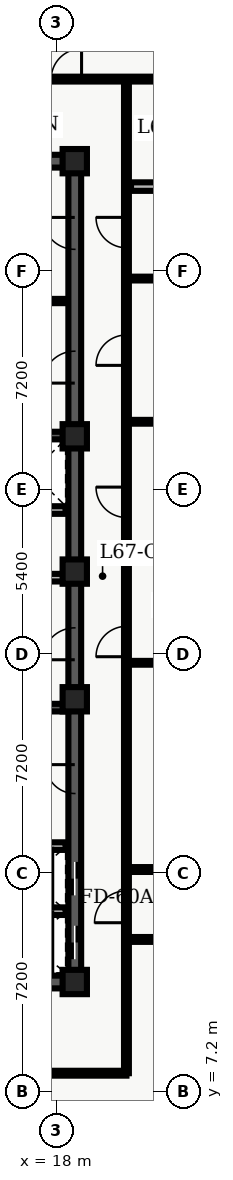
"""IFC4 building model, lengths in metres.
Left out: names, types, materials, properties, quantities, classifications, styles, units other than length and angle.
Written with IfcOpenShell. Run it as: python <this file> out.ifc"""

import sys

from ifc_helpers import new_model, entity, si_unit, converted_unit, direction, frame, origin_with_axes, origin_2d_with_axis, place, context, subcontext, project, spatial, polyline, rectangle, outline, extrude, element, fill, save


model = new_model("IFC4")
c1 = context("Model", 3, precision=1e-05, world=origin_with_axes(), true_north=direction((0.0, 1.0)))
c2 = subcontext(c1, "Body", "Model", "MODEL_VIEW")
j1 = project(units=[si_unit("LENGTHUNIT", "METRE"), converted_unit("PLANEANGLEUNIT", "DEGREE", entity("IfcPlaneAngleMeasure", 0.017), si_unit("PLANEANGLEUNIT", "RADIAN"), dimensions=[0, 0, 0, 0, 0, 0, 0])], contexts=[c1])
p1 = place(None, origin_with_axes())
s1 = spatial("IfcSite", under=j1, at=p1, CompositionType="ELEMENT")
p2 = place(p1, origin_with_axes())
s2 = spatial("IfcBuilding", under=s1, at=p2, CompositionType="ELEMENT")
p3 = place(p2, frame((0.0, 0.0, 272.4), z_axis=(0.0, 0.0, 1.0), x_axis=(1.0, 0.0, 0.0)))
s3 = spatial("IfcBuildingStorey", under=s2, at=p3, CompositionType="ELEMENT", Elevation=272.4)
p4 = place(p3, frame((11.4, 10.8, 0.0), z_axis=(0.0, 0.0, 1.0), x_axis=(1.0, 0.0, 0.0)))
e1 = element("IfcWall", 1, at=p4, inside=s3, PredefinedType="SHEAR", context=c2, shape_type="SweptSolid", body=[
    extrude(outline(polyline([(0.0, -0.21), (7.2, -0.21), (7.2, 0.21), (0.0, 0.21), (0.0, -0.21)])), origin_with_axes(), (0.0, 0.0, 1.0), 3.66),
])
p5 = place(p4, frame((2.625, 0.0, 0.0), z_axis=(0.0, 0.0, 1.0), x_axis=(1.0, 0.0, 0.0)))
e2 = element("IfcOpeningElement", 2, at=p5, cuts=e1, PredefinedType="OPENING", context=c2, shape_type="SweptSolid", body=[
    extrude(rectangle(XDim=1.05, YDim=0.44, at=origin_2d_with_axis()), origin_with_axes(), (0.0, 0.0, 1.0), 2.15),
])
p6 = place(p3, frame((11.4, 37.8, 0.0), z_axis=(0.0, 0.0, 1.0), x_axis=(1.0, 0.0, 0.0)))
e3 = element("IfcWall", 3, at=p6, inside=s3, PredefinedType="SHEAR", context=c2, shape_type="SweptSolid", body=[
    extrude(outline(polyline([(0.0, -0.21), (7.2, -0.21), (7.2, 0.21), (0.0, 0.21), (0.0, -0.21)])), origin_with_axes(), (0.0, 0.0, 1.0), 3.66),
])
p7 = place(p6, frame((2.625, 0.0, 0.0), z_axis=(0.0, 0.0, 1.0), x_axis=(1.0, 0.0, 0.0)))
e4 = element("IfcOpeningElement", 4, at=p7, cuts=e3, PredefinedType="OPENING", context=c2, shape_type="SweptSolid", body=[
    extrude(rectangle(XDim=1.05, YDim=0.44, at=origin_2d_with_axis()), origin_with_axes(), (0.0, 0.0, 1.0), 2.15),
])
p8 = place(p3, frame((18.6, 10.8, 0.0), z_axis=(0.0, 0.0, 1.0), x_axis=(0.0, 1.0, 0.0)))
e5 = element("IfcWall", 5, at=p8, inside=s3, PredefinedType="SHEAR", context=c2, shape_type="SweptSolid", body=[
    extrude(outline(polyline([(0.0, -0.21), (13.5, -0.21), (13.5, 0.21), (0.0, 0.21), (0.0, -0.21)])), origin_with_axes(), (0.0, 0.0, 1.0), 3.66),
])
p9 = place(p8, frame((1.3, 0.0, 0.0), z_axis=(0.0, 0.0, 1.0), x_axis=(1.0, 0.0, 0.0)))
e6 = element("IfcOpeningElement", 6, at=p9, cuts=e5, PredefinedType="OPENING", context=c2, shape_type="SweptSolid", body=[
    extrude(rectangle(XDim=1.1, YDim=0.44, at=origin_2d_with_axis()), origin_with_axes(), (0.0, 0.0, 1.0), 2.15),
])
p10 = place(p8, frame((3.4, 0.0, 0.0), z_axis=(0.0, 0.0, 1.0), x_axis=(1.0, 0.0, 0.0)))
e7 = element("IfcOpeningElement", 7, at=p10, cuts=e5, PredefinedType="OPENING", context=c2, shape_type="SweptSolid", body=[
    extrude(rectangle(XDim=1.1, YDim=0.44, at=origin_2d_with_axis()), origin_with_axes(), (0.0, 0.0, 1.0), 2.15),
])
p11 = place(p8, frame((11.125, 0.0, 0.0), z_axis=(0.0, 0.0, 1.0), x_axis=(1.0, 0.0, 0.0)))
e8 = element("IfcOpeningElement", 8, at=p11, cuts=e5, PredefinedType="OPENING", context=c2, shape_type="SweptSolid", body=[
    extrude(rectangle(XDim=1.05, YDim=0.44, at=origin_2d_with_axis()), origin_with_axes(), (0.0, 0.0, 1.0), 2.15),
])
p12 = place(p8, frame((6.675, 0.0, 0.0), z_axis=(0.0, 0.0, 1.0), x_axis=(1.0, 0.0, 0.0)))
e9 = element("IfcOpeningElement", 9, at=p12, cuts=e5, PredefinedType="OPENING", context=c2, shape_type="SweptSolid", body=[
    extrude(rectangle(XDim=0.95, YDim=0.44, at=origin_2d_with_axis()), origin_with_axes(), (0.0, 0.0, 1.0), 2.15),
])
p13 = place(p3, frame((18.6, 24.3, 0.0), z_axis=(0.0, 0.0, 1.0), x_axis=(0.0, 1.0, 0.0)))
e10 = element("IfcWall", 10, at=p13, inside=s3, PredefinedType="SHEAR", context=c2, shape_type="SweptSolid", body=[
    extrude(outline(polyline([(0.0, -0.21), (13.5, -0.21), (13.5, 0.21), (0.0, 0.21), (0.0, -0.21)])), origin_with_axes(), (0.0, 0.0, 1.0), 3.66),
])
p14 = place(p13, frame((6.725, 0.0, 0.0), z_axis=(0.0, 0.0, 1.0), x_axis=(1.0, 0.0, 0.0)))
e11 = element("IfcOpeningElement", 11, at=p14, cuts=e10, PredefinedType="OPENING", context=c2, shape_type="SweptSolid", body=[
    extrude(rectangle(XDim=1.05, YDim=0.44, at=origin_2d_with_axis()), origin_with_axes(), (0.0, 0.0, 1.0), 2.15),
])
p15 = place(p13, frame((11.125, 0.0, 0.0), z_axis=(0.0, 0.0, 1.0), x_axis=(1.0, 0.0, 0.0)))
e12 = element("IfcOpeningElement", 12, at=p15, cuts=e10, PredefinedType="OPENING", context=c2, shape_type="SweptSolid", body=[
    extrude(rectangle(XDim=1.05, YDim=0.44, at=origin_2d_with_axis()), origin_with_axes(), (0.0, 0.0, 1.0), 2.15),
])
for number, where, z_axis, x_axis in (
    (13, (11.61, 19.825, 0.0), (0.0, 0.0, 1.0), (1.0, 0.0, 0.0)),
    (14, (11.61, 28.775, 0.0), (0.0, 0.0, 1.0), (1.0, 0.0, 0.0)),
):
    element("IfcWall", number, at=place(p3, frame(where, z_axis=z_axis, x_axis=x_axis)), inside=s3, PredefinedType="SHEAR", context=c2, shape_type="SweptSolid", body=[
        extrude(outline(polyline([(0.0, -0.125), (6.78, -0.125), (6.78, 0.125), (0.0, 0.125), (0.0, -0.125)])), origin_with_axes(), (0.0, 0.0, 1.0), 3.66),
    ])
p16 = place(p3, frame((11.7, 24.1, 0.0), z_axis=(0.0, 0.0, 1.0), x_axis=(1.0, 0.0, 0.0)))
e15 = element("IfcWall", 15, at=p16, inside=s3, PredefinedType="SOLIDWALL", context=c2, shape_type="SweptSolid", body=[
    extrude(outline(polyline([(0.0, -0.125), (6.6, -0.125), (6.6, 0.125), (0.0, 0.125), (0.0, -0.125)])), origin_with_axes(), (0.0, 0.0, 1.0), 2.7),
])
p17 = place(p16, frame((3.6, 0.0, 0.0), z_axis=(0.0, 0.0, 1.0), x_axis=(1.0, 0.0, 0.0)))
e16 = element("IfcOpeningElement", 16, at=p17, cuts=e15, PredefinedType="OPENING", context=c2, shape_type="SweptSolid", body=[
    extrude(rectangle(XDim=0.9, YDim=0.27, at=origin_2d_with_axis()), origin_with_axes(), (0.0, 0.0, 1.0), 2.15),
])
p18 = place(p16, frame((5.65, 0.0, 0.0), z_axis=(0.0, 0.0, 1.0), x_axis=(1.0, 0.0, 0.0)))
e17 = element("IfcOpeningElement", 17, at=p18, cuts=e15, PredefinedType="OPENING", context=c2, shape_type="SweptSolid", body=[
    extrude(rectangle(XDim=0.9, YDim=0.27, at=origin_2d_with_axis()), origin_with_axes(), (0.0, 0.0, 1.0), 2.15),
])
p19 = place(p3, frame((11.7, 26.325, 0.0), z_axis=(0.0, 0.0, 1.0), x_axis=(1.0, 0.0, 0.0)))
e18 = element("IfcWall", 18, at=p19, inside=s3, PredefinedType="SOLIDWALL", context=c2, shape_type="SweptSolid", body=[
    extrude(outline(polyline([(0.0, -0.125), (6.6, -0.125), (6.6, 0.125), (0.0, 0.125), (0.0, -0.125)])), origin_with_axes(), (0.0, 0.0, 1.0), 2.7),
])
p20 = place(p19, frame((3.5, 0.0, 0.0), z_axis=(0.0, 0.0, 1.0), x_axis=(1.0, 0.0, 0.0)))
e19 = element("IfcOpeningElement", 19, at=p20, cuts=e18, PredefinedType="OPENING", context=c2, shape_type="SweptSolid", body=[
    extrude(rectangle(XDim=0.9, YDim=0.27, at=origin_2d_with_axis()), origin_with_axes(), (0.0, 0.0, 1.0), 2.15),
])
for number, where, z_axis, x_axis in (
    (20, (18.6, 10.8, 0.0), (0.0, 0.0, 1.0), (1.0, 0.0, 0.0)),
    (21, (18.6, 20.1, 0.0), (0.0, 0.0, 1.0), (1.0, 0.0, 0.0)),
    (22, (18.6, 24.3, 0.0), (0.0, 0.0, 1.0), (1.0, 0.0, 0.0)),
    (23, (18.6, 28.75, 0.0), (0.0, 0.0, 1.0), (1.0, 0.0, 0.0)),
    (24, (18.6, 37.8, 0.0), (0.0, 0.0, 1.0), (1.0, 0.0, 0.0)),
):
    element("IfcColumn", number, at=place(p3, frame(where, z_axis=z_axis, x_axis=x_axis)), inside=s3, PredefinedType="COLUMN", context=c2, shape_type="SweptSolid", body=[
        extrude(rectangle(XDim=0.8, YDim=0.8, at=origin_2d_with_axis()), origin_with_axes(), (0.0, 0.0, 1.0), 3.9),
    ])
for number, where, z_axis, x_axis in (
    (25, (15.84, 13.13, 0.0), (0.0, 0.0, 1.0), (1.0, 0.0, 0.0)),
    (26, (15.84, 15.27, 0.0), (0.0, 0.0, 1.0), (1.0, 0.0, 0.0)),
):
    element("IfcWall", number, at=place(p3, frame(where, z_axis=z_axis, x_axis=x_axis)), inside=s3, PredefinedType="SOLIDWALL", context=c2, shape_type="SweptSolid", body=[
        extrude(outline(polyline([(0.0, -0.125), (2.46, -0.125), (2.46, 0.125), (0.0, 0.125), (0.0, -0.125)])), origin_with_axes(), (0.0, 0.0, 1.0), 2.7),
    ])
p21 = place(p3, frame((15.84, 33.2, 0.0), z_axis=(0.0, 0.0, 1.0), x_axis=(1.0, 0.0, 0.0)))
e27 = element("IfcWall", 27, at=p21, inside=s3, PredefinedType="PARTITIONING", context=c2, shape_type="SweptSolid", body=[
    extrude(outline(polyline([(0.0, -0.07), (2.46, -0.07), (2.46, 0.07), (0.0, 0.07), (0.0, -0.07)])), origin_with_axes(), (0.0, 0.0, 1.0), 2.7),
])
p22 = place(p3, frame((8.135, 7.8, 0.0), z_axis=(0.0, 0.0, 1.0), x_axis=(1.0, 0.0, 0.0)))
e28 = element("IfcWall", 28, at=p22, inside=s3, PredefinedType="PARTITIONING", context=c2, shape_type="SweptSolid", body=[
    extrude(outline(polyline([(0.0, -0.08), (12.165, -0.08), (12.165, 0.08), (0.0, 0.08), (0.0, -0.08)])), origin_with_axes(), (0.0, 0.0, 1.0), 2.7),
])
p23 = place(p22, frame((3.994, 0.0, 0.0), z_axis=(0.0, 0.0, 1.0), x_axis=(1.0, 0.0, 0.0)))
e29 = element("IfcOpeningElement", 29, at=p23, cuts=e28, PredefinedType="OPENING", context=c2, shape_type="SweptSolid", body=[
    extrude(rectangle(XDim=1.0, YDim=0.18, at=origin_2d_with_axis()), origin_with_axes(), (0.0, 0.0, 1.0), 2.15),
])
p24 = place(p22, frame((8.794, 0.0, 0.0), z_axis=(0.0, 0.0, 1.0), x_axis=(1.0, 0.0, 0.0)))
e30 = element("IfcOpeningElement", 30, at=p24, cuts=e28, PredefinedType="OPENING", context=c2, shape_type="SweptSolid", body=[
    extrude(rectangle(XDim=1.0, YDim=0.18, at=origin_2d_with_axis()), origin_with_axes(), (0.0, 0.0, 1.0), 2.15),
])
p25 = place(p3, frame((8.135, 40.5, 0.0), z_axis=(0.0, 0.0, 1.0), x_axis=(1.0, 0.0, 0.0)))
e31 = element("IfcWall", 31, at=p25, inside=s3, PredefinedType="PARTITIONING", context=c2, shape_type="SweptSolid", body=[
    extrude(outline(polyline([(0.0, -0.08), (23.93, -0.08), (23.93, 0.08), (0.0, 0.08), (0.0, -0.08)])), origin_with_axes(), (0.0, 0.0, 1.0), 2.7),
])
p26 = place(p25, frame((0.76, 0.0, 0.0), z_axis=(0.0, 0.0, 1.0), x_axis=(1.0, 0.0, 0.0)))
e32 = element("IfcOpeningElement", 32, at=p26, cuts=e31, PredefinedType="OPENING", context=c2, shape_type="SweptSolid", body=[
    extrude(rectangle(XDim=1.0, YDim=0.18, at=origin_2d_with_axis()), origin_with_axes(), (0.0, 0.0, 1.0), 2.15),
])
p27 = place(p25, frame((4.729, 0.0, 0.0), z_axis=(0.0, 0.0, 1.0), x_axis=(1.0, 0.0, 0.0)))
e33 = element("IfcOpeningElement", 33, at=p27, cuts=e31, PredefinedType="OPENING", context=c2, shape_type="SweptSolid", body=[
    extrude(rectangle(XDim=1.0, YDim=0.18, at=origin_2d_with_axis()), origin_with_axes(), (0.0, 0.0, 1.0), 2.15),
])
p28 = place(p25, frame((7.574, 0.0, 0.0), z_axis=(0.0, 0.0, 1.0), x_axis=(1.0, 0.0, 0.0)))
e34 = element("IfcOpeningElement", 34, at=p28, cuts=e31, PredefinedType="OPENING", context=c2, shape_type="SweptSolid", body=[
    extrude(rectangle(XDim=1.0, YDim=0.18, at=origin_2d_with_axis()), origin_with_axes(), (0.0, 0.0, 1.0), 2.15),
])
p29 = place(p25, frame((10.189, 0.0, 0.0), z_axis=(0.0, 0.0, 1.0), x_axis=(1.0, 0.0, 0.0)))
e35 = element("IfcOpeningElement", 35, at=p29, cuts=e31, PredefinedType="OPENING", context=c2, shape_type="SweptSolid", body=[
    extrude(rectangle(XDim=1.0, YDim=0.18, at=origin_2d_with_axis()), origin_with_axes(), (0.0, 0.0, 1.0), 2.15),
])
p30 = place(p3, frame((20.3, 7.8, 0.0), z_axis=(0.0, 0.0, 1.0), x_axis=(0.0, 1.0, 0.0)))
e36 = element("IfcWall", 36, at=p30, inside=s3, PredefinedType="PARTITIONING", context=c2, shape_type="SweptSolid", body=[
    extrude(outline(polyline([(0.0, -0.08), (32.7, -0.08), (32.7, 0.08), (0.0, 0.08), (0.0, -0.08)])), origin_with_axes(), (0.0, 0.0, 1.0), 2.7),
])
p31 = place(p30, frame((14.2, 0.0, 0.0), z_axis=(0.0, 0.0, 1.0), x_axis=(1.0, 0.0, 0.0)))
e37 = element("IfcOpeningElement", 37, at=p31, cuts=e36, PredefinedType="OPENING", context=c2, shape_type="SweptSolid", body=[
    extrude(rectangle(XDim=1.0, YDim=0.18, at=origin_2d_with_axis()), origin_with_axes(), (0.0, 0.0, 1.0), 2.15),
])
p32 = place(p30, frame((18.779, 0.0, 0.0), z_axis=(0.0, 0.0, 1.0), x_axis=(1.0, 0.0, 0.0)))
e38 = element("IfcOpeningElement", 38, at=p32, cuts=e36, PredefinedType="OPENING", context=c2, shape_type="SweptSolid", body=[
    extrude(rectangle(XDim=1.0, YDim=0.18, at=origin_2d_with_axis()), origin_with_axes(), (0.0, 0.0, 1.0), 2.15),
])
p33 = place(p30, frame((23.784, 0.0, 0.0), z_axis=(0.0, 0.0, 1.0), x_axis=(1.0, 0.0, 0.0)))
e39 = element("IfcOpeningElement", 39, at=p33, cuts=e36, PredefinedType="OPENING", context=c2, shape_type="SweptSolid", body=[
    extrude(rectangle(XDim=1.0, YDim=0.18, at=origin_2d_with_axis()), origin_with_axes(), (0.0, 0.0, 1.0), 2.15),
])
p34 = place(p30, frame((27.651, 0.0, 0.0), z_axis=(0.0, 0.0, 1.0), x_axis=(1.0, 0.0, 0.0)))
e40 = element("IfcOpeningElement", 40, at=p34, cuts=e36, PredefinedType="OPENING", context=c2, shape_type="SweptSolid", body=[
    extrude(rectangle(XDim=1.0, YDim=0.18, at=origin_2d_with_axis()), origin_with_axes(), (0.0, 0.0, 1.0), 2.15),
])
p35 = place(p30, frame((5.475, 0.0, 0.0), z_axis=(0.0, 0.0, 1.0), x_axis=(1.0, 0.0, 0.0)))
e41 = element("IfcOpeningElement", 41, at=p35, cuts=e36, PredefinedType="OPENING", context=c2, shape_type="SweptSolid", body=[
    extrude(rectangle(XDim=1.05, YDim=0.18, at=origin_2d_with_axis()), origin_with_axes(), (0.0, 0.0, 1.0), 2.15),
])
p36 = place(p3, frame((20.45, 25.05, 0.0), z_axis=(0.0, 0.0, 1.0), x_axis=(1.0, 0.0, 0.0)))
e42 = element("IfcWall", 42, at=p36, inside=s3, PredefinedType="PARTITIONING", context=c2, shape_type="SweptSolid", body=[
    extrude(outline(polyline([(0.0, -0.14), (11.615, -0.14), (11.615, 0.14), (0.0, 0.14), (0.0, -0.14)])), origin_with_axes(), (0.0, 0.0, 1.0), 2.7),
])
for number, where, z_axis, x_axis in (
    (43, (20.45, 29.228, 0.0), (0.0, 0.0, 1.0), (1.0, 0.0, 0.0)),
    (44, (20.45, 33.939, 0.0), (0.0, 0.0, 1.0), (1.0, 0.0, 0.0)),
):
    element("IfcWall", number, at=place(p3, frame(where, z_axis=z_axis, x_axis=x_axis)), inside=s3, PredefinedType="PARTITIONING", context=c2, shape_type="SweptSolid", body=[
        extrude(outline(polyline([(0.0, -0.062), (11.615, -0.062), (11.615, 0.062), (0.0, 0.062), (0.0, -0.062)])), origin_with_axes(), (0.0, 0.0, 1.0), 2.7),
    ])
p37 = place(p3, frame((20.45, 36.964, 0.0), z_axis=(0.0, 0.0, 1.0), x_axis=(1.0, 0.0, 0.0)))
e45 = element("IfcWall", 45, at=p37, inside=s3, PredefinedType="PARTITIONING", context=c2, shape_type="SweptSolid", body=[
    extrude(outline(polyline([(0.0, -0.14), (11.615, -0.14), (11.615, 0.14), (0.0, 0.14), (0.0, -0.14)])), origin_with_axes(), (0.0, 0.0, 1.0), 2.7),
])
p38 = place(p37, frame((3.375, 0.0, 0.0), z_axis=(0.0, 0.0, 1.0), x_axis=(1.0, 0.0, 0.0)))
e46 = element("IfcOpeningElement", 46, at=p38, cuts=e45, PredefinedType="OPENING", context=c2, shape_type="SweptSolid", body=[
    extrude(rectangle(XDim=0.95, YDim=0.3, at=origin_2d_with_axis()), origin_with_axes(), (0.0, 0.0, 1.0), 2.15),
])
p39 = place(p3, frame((20.3, 12.2, 0.0), z_axis=(0.0, 0.0, 1.0), x_axis=(1.0, 0.0, 0.0)))
e47 = element("IfcWall", 47, at=p39, inside=s3, PredefinedType="PARTITIONING", context=c2, shape_type="SweptSolid", body=[
    extrude(outline(polyline([(0.0, -0.08), (14.85, -0.08), (14.85, 0.08), (0.0, 0.08), (0.0, -0.08)])), origin_with_axes(), (0.0, 0.0, 1.0), 2.7),
])
p40 = place(p39, frame((8.355, 0.0, 0.0), z_axis=(0.0, 0.0, 1.0), x_axis=(1.0, 0.0, 0.0)))
e48 = element("IfcOpeningElement", 48, at=p40, cuts=e47, PredefinedType="OPENING", context=c2, shape_type="SweptSolid", body=[
    extrude(rectangle(XDim=1.0, YDim=0.18, at=origin_2d_with_axis()), origin_with_axes(), (0.0, 0.0, 1.0), 2.15),
])
p41 = place(p3, frame((20.3, 14.5, 0.0), z_axis=(0.0, 0.0, 1.0), x_axis=(1.0, 0.0, 0.0)))
e49 = element("IfcWall", 49, at=p41, inside=s3, PredefinedType="PARTITIONING", context=c2, shape_type="SweptSolid", body=[
    extrude(outline(polyline([(0.0, -0.08), (14.85, -0.08), (14.85, 0.08), (0.0, 0.08), (0.0, -0.08)])), origin_with_axes(), (0.0, 0.0, 1.0), 2.7),
])
p42 = place(p41, frame((1.739, 0.0, 0.0), z_axis=(0.0, 0.0, 1.0), x_axis=(1.0, 0.0, 0.0)))
e50 = element("IfcOpeningElement", 50, at=p42, cuts=e49, PredefinedType="OPENING", context=c2, shape_type="SweptSolid", body=[
    extrude(rectangle(XDim=1.0, YDim=0.18, at=origin_2d_with_axis()), origin_with_axes(), (0.0, 0.0, 1.0), 2.15),
])
p43 = place(p41, frame((5.299, 0.0, 0.0), z_axis=(0.0, 0.0, 1.0), x_axis=(1.0, 0.0, 0.0)))
e51 = element("IfcOpeningElement", 51, at=p43, cuts=e49, PredefinedType="OPENING", context=c2, shape_type="SweptSolid", body=[
    extrude(rectangle(XDim=1.0, YDim=0.18, at=origin_2d_with_axis()), origin_with_axes(), (0.0, 0.0, 1.0), 2.15),
])
p44 = place(p41, frame((8.889, 0.0, 0.0), z_axis=(0.0, 0.0, 1.0), x_axis=(1.0, 0.0, 0.0)))
e52 = element("IfcOpeningElement", 52, at=p44, cuts=e49, PredefinedType="OPENING", context=c2, shape_type="SweptSolid", body=[
    extrude(rectangle(XDim=1.0, YDim=0.18, at=origin_2d_with_axis()), origin_with_axes(), (0.0, 0.0, 1.0), 2.15),
])
p45 = place(p41, frame((12.624, 0.0, 0.0), z_axis=(0.0, 0.0, 1.0), x_axis=(1.0, 0.0, 0.0)))
e53 = element("IfcOpeningElement", 53, at=p45, cuts=e49, PredefinedType="OPENING", context=c2, shape_type="SweptSolid", body=[
    extrude(rectangle(XDim=1.0, YDim=0.18, at=origin_2d_with_axis()), origin_with_axes(), (0.0, 0.0, 1.0), 2.15),
])
p46 = place(p3, frame((20.3, 21.3, 0.0), z_axis=(0.0, 0.0, 1.0), x_axis=(1.0, 0.0, 0.0)))
e54 = element("IfcWall", 54, at=p46, inside=s3, PredefinedType="PARTITIONING", context=c2, shape_type="SweptSolid", body=[
    extrude(outline(polyline([(0.0, -0.062), (11.765, -0.062), (11.765, 0.062), (0.0, 0.062), (0.0, -0.062)])), origin_with_axes(), (0.0, 0.0, 1.0), 2.7),
])
p47 = place(p8, frame((1.3, 0.0, 0.0), z_axis=(0.0, 0.0, 1.0), x_axis=(1.0, 0.0, 0.0)))
e55 = element("IfcDoor", 55, at=p47, inside=s3, OperationType="SLIDING_TO_LEFT", PredefinedType="DOOR", context=c2, shape_type="SweptSolid", body=[
    extrude(rectangle(XDim=1.1, YDim=0.09, at=origin_2d_with_axis()), origin_with_axes(), (0.0, 0.0, 1.0), 2.15),
])
fill(e6, e55)
p48 = place(p8, frame((3.4, 0.0, 0.0), z_axis=(0.0, 0.0, 1.0), x_axis=(1.0, 0.0, 0.0)))
e56 = element("IfcDoor", 56, at=p48, inside=s3, OperationType="SLIDING_TO_RIGHT", PredefinedType="DOOR", context=c2, shape_type="SweptSolid", body=[
    extrude(rectangle(XDim=1.1, YDim=0.09, at=origin_2d_with_axis()), origin_with_axes(), (0.0, 0.0, 1.0), 2.15),
])
fill(e7, e56)
p49 = place(p8, frame((11.125, 0.0, 0.0), z_axis=(0.0, 0.0, 1.0), x_axis=(1.0, 0.0, 0.0)))
e57 = element("IfcDoor", 57, at=p49, inside=s3, OperationType="SINGLE_SWING_LEFT", PredefinedType="DOOR", context=c2, shape_type="SweptSolid", body=[
    extrude(rectangle(XDim=1.05, YDim=0.09, at=origin_2d_with_axis()), origin_with_axes(), (0.0, 0.0, 1.0), 2.15),
])
fill(e8, e57)
p50 = place(p8, frame((6.675, 0.0, 0.0), z_axis=(0.0, 0.0, 1.0), x_axis=(1.0, 0.0, 0.0)))
e58 = element("IfcDoor", 58, at=p50, inside=s3, OperationType="SINGLE_SWING_RIGHT", PredefinedType="DOOR", context=c2, shape_type="SweptSolid", body=[
    extrude(rectangle(XDim=0.95, YDim=0.09, at=origin_2d_with_axis()), origin_with_axes(), (0.0, 0.0, 1.0), 2.15),
])
fill(e9, e58)
p51 = place(p13, frame((6.725, 0.0, 0.0), z_axis=(0.0, 0.0, 1.0), x_axis=(1.0, 0.0, 0.0)))
e59 = element("IfcDoor", 59, at=p51, inside=s3, OperationType="SINGLE_SWING_LEFT", PredefinedType="DOOR", context=c2, shape_type="SweptSolid", body=[
    extrude(rectangle(XDim=1.05, YDim=0.09, at=origin_2d_with_axis()), origin_with_axes(), (0.0, 0.0, 1.0), 2.15),
])
fill(e11, e59)
p52 = place(p13, frame((11.125, 0.0, 0.0), z_axis=(0.0, 0.0, 1.0), x_axis=(1.0, 0.0, 0.0)))
e60 = element("IfcDoor", 60, at=p52, inside=s3, OperationType="SINGLE_SWING_RIGHT", PredefinedType="DOOR", context=c2, shape_type="SweptSolid", body=[
    extrude(rectangle(XDim=1.05, YDim=0.09, at=origin_2d_with_axis()), origin_with_axes(), (0.0, 0.0, 1.0), 2.15),
])
fill(e12, e60)
p53 = place(p25, frame((10.189, 0.0, 0.0), z_axis=(0.0, 0.0, 1.0), x_axis=(1.0, 0.0, 0.0)))
e61 = element("IfcDoor", 61, at=p53, inside=s3, OperationType="SINGLE_SWING_RIGHT", PredefinedType="DOOR", context=c2, shape_type="SweptSolid", body=[
    extrude(rectangle(XDim=1.0, YDim=0.09, at=origin_2d_with_axis()), origin_with_axes(), (0.0, 0.0, 1.0), 2.15),
])
fill(e35, e61)
p54 = place(p30, frame((14.2, 0.0, 0.0), z_axis=(0.0, 0.0, 1.0), x_axis=(1.0, 0.0, 0.0)))
e62 = element("IfcDoor", 62, at=p54, inside=s3, OperationType="SINGLE_SWING_LEFT", PredefinedType="DOOR", context=c2, shape_type="SweptSolid", body=[
    extrude(rectangle(XDim=1.0, YDim=0.09, at=origin_2d_with_axis()), origin_with_axes(), (0.0, 0.0, 1.0), 2.15),
])
fill(e37, e62)
p55 = place(p30, frame((18.779, 0.0, 0.0), z_axis=(0.0, 0.0, 1.0), x_axis=(1.0, 0.0, 0.0)))
e63 = element("IfcDoor", 63, at=p55, inside=s3, OperationType="SINGLE_SWING_RIGHT", PredefinedType="DOOR", context=c2, shape_type="SweptSolid", body=[
    extrude(rectangle(XDim=1.0, YDim=0.09, at=origin_2d_with_axis()), origin_with_axes(), (0.0, 0.0, 1.0), 2.15),
])
fill(e38, e63)
p56 = place(p30, frame((23.784, 0.0, 0.0), z_axis=(0.0, 0.0, 1.0), x_axis=(1.0, 0.0, 0.0)))
e64 = element("IfcDoor", 64, at=p56, inside=s3, OperationType="SINGLE_SWING_LEFT", PredefinedType="DOOR", context=c2, shape_type="SweptSolid", body=[
    extrude(rectangle(XDim=1.0, YDim=0.09, at=origin_2d_with_axis()), origin_with_axes(), (0.0, 0.0, 1.0), 2.15),
])
fill(e39, e64)
p57 = place(p30, frame((27.651, 0.0, 0.0), z_axis=(0.0, 0.0, 1.0), x_axis=(1.0, 0.0, 0.0)))
e65 = element("IfcDoor", 65, at=p57, inside=s3, OperationType="SINGLE_SWING_RIGHT", PredefinedType="DOOR", context=c2, shape_type="SweptSolid", body=[
    extrude(rectangle(XDim=1.0, YDim=0.09, at=origin_2d_with_axis()), origin_with_axes(), (0.0, 0.0, 1.0), 2.15),
])
fill(e40, e65)
p58 = place(p30, frame((5.475, 0.0, 0.0), z_axis=(0.0, 0.0, 1.0), x_axis=(1.0, 0.0, 0.0)))
e66 = element("IfcDoor", 66, at=p58, inside=s3, OperationType="SINGLE_SWING_LEFT", PredefinedType="DOOR", context=c2, shape_type="SweptSolid", body=[
    extrude(rectangle(XDim=1.05, YDim=0.09, at=origin_2d_with_axis()), origin_with_axes(), (0.0, 0.0, 1.0), 2.15),
])
fill(e41, e66)
save(model, sys.argv[1])
